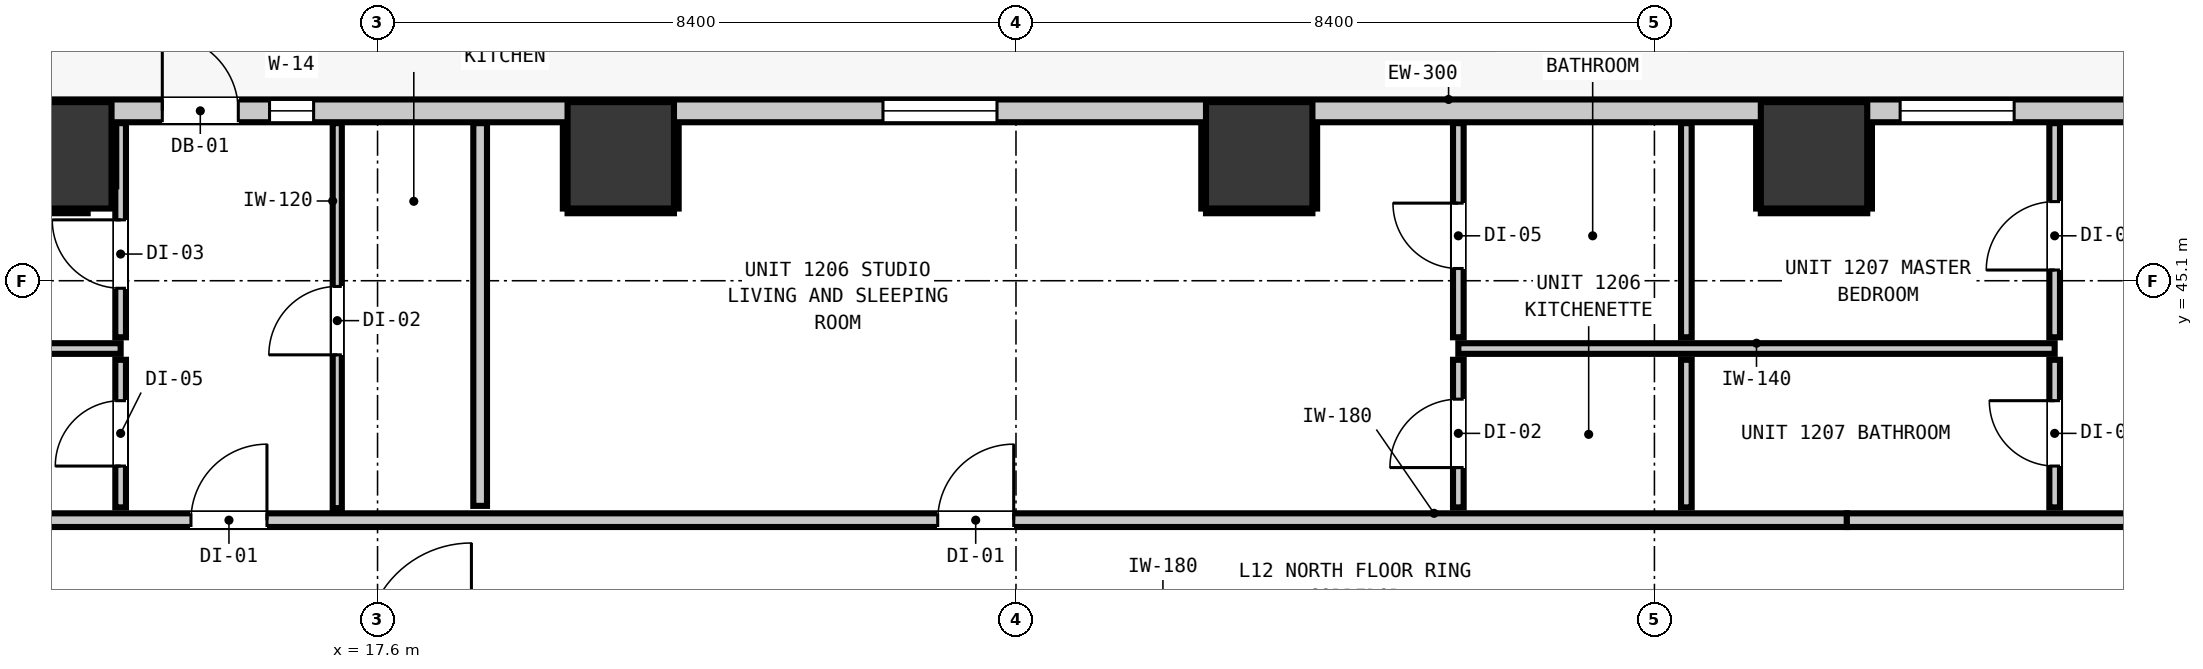
"""IFC4 building model, lengths in metres.
Left out: names, types, materials, properties, quantities, classifications, styles, units other than length and angle.
Written with IfcOpenShell. Run it as: python <this file> out.ifc"""

import sys

from ifc_helpers import new_model, si_unit, direction, frame, frame_2d, origin, origin_2d, place, context, subcontext, project, spatial, rectangle, extrude, element, fill, save


model = new_model("IFC4")
c1 = context("Model", 3, precision=1e-05, world=origin(), true_north=direction((0.0, 1.0)))
c2 = subcontext(c1, "Body", "Model", "MODEL_VIEW")
j1 = project(units=[si_unit("LENGTHUNIT", "METRE"), si_unit("PLANEANGLEUNIT", "RADIAN")], contexts=[c1])
p1 = place(None, origin())
s1 = spatial("IfcSite", under=j1, at=p1, CompositionType="ELEMENT")
p2 = place(p1, origin())
s2 = spatial("IfcBuilding", under=s1, at=p2, CompositionType="ELEMENT")
p3 = place(p2, frame((0.0, 0.0, 45.24)))
s3 = spatial("IfcBuildingStorey", under=s2, at=p3, CompositionType="ELEMENT", Elevation=45.24)
for number, where, z_axis, x_axis in (
    (1, (13.4, 46.75, 0.0), (0.0, 0.0, 1.0), (1.0, 0.0, 0.0)),
    (2, (20.8, 46.75, 0.0), (0.0, 0.0, 1.0), (1.0, 0.0, 0.0)),
    (3, (29.2, 46.75, 0.0), (0.0, 0.0, 1.0), (1.0, 0.0, 0.0)),
    (4, (36.5, 46.75, 0.0), (0.0, 0.0, 1.0), (1.0, 0.0, 0.0)),
):
    element("IfcColumn", number, at=place(p3, frame(where, z_axis=z_axis, x_axis=x_axis)), inside=s3, PredefinedType="COLUMN", context=c2, shape_type="SweptSolid", body=[
        extrude(rectangle(XDim=1.4, YDim=1.4, at=origin_2d()), origin(), (0.0, 0.0, 1.0), 3.32),
    ])
p4 = place(p3, frame((10.365, 47.335, 0.0), z_axis=(0.0, 0.0, 1.0), x_axis=(1.0, 0.0, 0.0)))
e5 = element("IfcWall", 5, at=p4, inside=s3, PredefinedType="STANDARD", context=c2, shape_type="SweptSolid", body=[
    extrude(rectangle(XDim=37.47, YDim=0.3, at=frame_2d((18.735, 0.0))), origin(), (0.0, 0.0, 1.0), 3.06),
])
p5 = place(p4, frame((4.403, 0.0, 0.0)))
e6 = element("IfcOpeningElement", 6, at=p5, cuts=e5, PredefinedType="OPENING", context=c2, shape_type="SweptSolid", body=[
    extrude(rectangle(XDim=1.0, YDim=2.15, at=frame_2d((0.5, 1.075))), frame((0.0, 0.16, 0.0), z_axis=(0.0, -1.0, 0.0), x_axis=(1.0, 0.0, 0.0)), (0.0, 0.0, 1.0), 0.32),
])
p6 = place(p4, frame((5.814, 0.0, 0.85)))
e7 = element("IfcOpeningElement", 7, at=p6, cuts=e5, PredefinedType="OPENING", context=c2, shape_type="SweptSolid", body=[
    extrude(rectangle(XDim=0.58, YDim=1.5, at=frame_2d((0.29, 0.75))), frame((0.0, 0.16, 0.0), z_axis=(0.0, -1.0, 0.0), x_axis=(1.0, 0.0, 0.0)), (0.0, 0.0, 1.0), 0.32),
])
p7 = place(p4, frame((0.462, 0.0, 0.85)))
e8 = element("IfcOpeningElement", 8, at=p7, cuts=e5, PredefinedType="OPENING", context=c2, shape_type="SweptSolid", body=[
    extrude(rectangle(XDim=1.5, YDim=1.8, at=frame_2d((0.75, 0.9))), frame((0.0, 0.16, 0.0), z_axis=(0.0, -1.0, 0.0), x_axis=(1.0, 0.0, 0.0)), (0.0, 0.0, 1.0), 0.32),
])
p8 = place(p4, frame((13.885, 0.0, 0.85)))
e9 = element("IfcOpeningElement", 9, at=p8, cuts=e5, PredefinedType="OPENING", context=c2, shape_type="SweptSolid", body=[
    extrude(rectangle(XDim=1.5, YDim=1.8, at=frame_2d((0.75, 0.9))), frame((0.0, 0.16, 0.0), z_axis=(0.0, -1.0, 0.0), x_axis=(1.0, 0.0, 0.0)), (0.0, 0.0, 1.0), 0.32),
])
p9 = place(p4, frame((31.742, 0.0, 0.85)))
e10 = element("IfcOpeningElement", 10, at=p9, cuts=e5, PredefinedType="OPENING", context=c2, shape_type="SweptSolid", body=[
    extrude(rectangle(XDim=1.5, YDim=1.8, at=frame_2d((0.75, 0.9))), frame((0.0, 0.16, 0.0), z_axis=(0.0, -1.0, 0.0), x_axis=(1.0, 0.0, 0.0)), (0.0, 0.0, 1.0), 0.32),
])
p10 = place(p4, frame((27.268, 0.0, 0.85)))
e11 = element("IfcOpeningElement", 11, at=p10, cuts=e5, PredefinedType="OPENING", context=c2, shape_type="SweptSolid", body=[
    extrude(rectangle(XDim=1.5, YDim=1.8, at=frame_2d((0.75, 0.9))), frame((0.0, 0.16, 0.0), z_axis=(0.0, -1.0, 0.0), x_axis=(1.0, 0.0, 0.0)), (0.0, 0.0, 1.0), 0.32),
])
p11 = place(p3, frame((8.027, 41.95, 0.0), z_axis=(0.0, 0.0, 1.0), x_axis=(1.0, 0.0, 0.0)))
e12 = element("IfcWall", 12, at=p11, inside=s3, PredefinedType="PARTITIONING", context=c2, shape_type="SweptSolid", body=[
    extrude(rectangle(XDim=28.905, YDim=0.18, at=frame_2d((14.452, 0.0))), origin(), (0.0, 0.0, 1.0), 3.06),
])
p12 = place(p11, frame((7.118, 0.0, 0.0)))
e13 = element("IfcOpeningElement", 13, at=p12, cuts=e12, PredefinedType="OPENING", context=c2, shape_type="SweptSolid", body=[
    extrude(rectangle(XDim=1.0, YDim=2.15, at=frame_2d((0.5, 1.075))), frame((0.0, 0.1, 0.0), z_axis=(0.0, -1.0, 0.0), x_axis=(1.0, 0.0, 0.0)), (0.0, 0.0, 1.0), 0.2),
])
p13 = place(p11, frame((16.943, 0.0, 0.0)))
e14 = element("IfcOpeningElement", 14, at=p13, cuts=e12, PredefinedType="OPENING", context=c2, shape_type="SweptSolid", body=[
    extrude(rectangle(XDim=1.0, YDim=2.15, at=frame_2d((0.5, 1.075))), frame((0.0, 0.1, 0.0), z_axis=(0.0, -1.0, 0.0), x_axis=(1.0, 0.0, 0.0)), (0.0, 0.0, 1.0), 0.2),
])
p14 = place(p3, frame((36.932, 41.95, 0.0), z_axis=(0.0, 0.0, 1.0), x_axis=(1.0, 0.0, 0.0)))
e15 = element("IfcWall", 15, at=p14, inside=s3, PredefinedType="PARTITIONING", context=c2, shape_type="SweptSolid", body=[
    extrude(rectangle(XDim=12.386, YDim=0.18, at=frame_2d((6.193, 0.0))), origin(), (0.0, 0.0, 1.0), 2.445),
])
p15 = place(p14, frame((5.425, 0.0, 0.0)))
e16 = element("IfcOpeningElement", 16, at=p15, cuts=e15, PredefinedType="OPENING", context=c2, shape_type="SweptSolid", body=[
    extrude(rectangle(XDim=1.0, YDim=2.15, at=frame_2d((0.5, 1.075))), frame((0.0, 0.1, 0.0), z_axis=(0.0, -1.0, 0.0), x_axis=(1.0, 0.0, 0.0)), (0.0, 0.0, 1.0), 0.2),
])
p16 = place(p3, frame((8.027, 44.208, 0.0), z_axis=(0.0, 0.0, 1.0), x_axis=(1.0, 0.0, 0.0)))
e17 = element("IfcWall", 17, at=p16, inside=s3, PredefinedType="PARTITIONING", context=c2, shape_type="SweptSolid", body=[
    extrude(rectangle(XDim=6.193, YDim=0.14, at=frame_2d((3.096, 0.0))), origin(), (0.0, 0.0, 1.0), 3.06),
])
p17 = place(p3, frame((31.82, 44.208, 0.0), z_axis=(0.0, 0.0, 1.0), x_axis=(1.0, 0.0, 0.0)))
e18 = element("IfcWall", 18, at=p17, inside=s3, PredefinedType="PARTITIONING", context=c2, shape_type="SweptSolid", body=[
    extrude(rectangle(XDim=7.846, YDim=0.14, at=frame_2d((3.923, 0.0))), origin(), (0.0, 0.0, 1.0), 3.06),
])
p18 = place(p3, frame((18.95, 42.138, 0.0), z_axis=(0.0, 0.0, 1.0), x_axis=(0.0, 1.0, 0.0)))
e19 = element("IfcWall", 19, at=p18, inside=s3, PredefinedType="PARTITIONING", context=c2, shape_type="SweptSolid", body=[
    extrude(rectangle(XDim=5.035, YDim=0.18, at=frame_2d((2.518, 0.0))), origin(), (0.0, 0.0, 1.0), 3.06),
])
p19 = place(p3, frame((14.22, 42.118, 0.0), z_axis=(0.0, 0.0, 1.0), x_axis=(0.0, 1.0, 0.0)))
e20 = element("IfcWall", 20, at=p19, inside=s3, PredefinedType="PARTITIONING", context=c2, shape_type="SweptSolid", body=[
    extrude(rectangle(XDim=1.942, YDim=0.14, at=frame_2d((0.971, 0.0))), origin(), (0.0, 0.0, 1.0), 3.06),
])
p20 = place(p19, frame((0.544, 0.0, 0.0)))
e21 = element("IfcOpeningElement", 21, at=p20, cuts=e20, PredefinedType="OPENING", context=c2, shape_type="SweptSolid", body=[
    extrude(rectangle(XDim=0.86, YDim=2.02, at=frame_2d((0.43, 1.01))), frame((0.0, 0.08, 0.0), z_axis=(0.0, -1.0, 0.0), x_axis=(1.0, 0.0, 0.0)), (0.0, 0.0, 1.0), 0.16),
])
p21 = place(p3, frame((14.22, 44.356, 0.0), z_axis=(0.0, 0.0, 1.0), x_axis=(0.0, 1.0, 0.0)))
e22 = element("IfcWall", 22, at=p21, inside=s3, PredefinedType="PARTITIONING", context=c2, shape_type="SweptSolid", body=[
    extrude(rectangle(XDim=2.817, YDim=0.14, at=frame_2d((1.409, 0.0))), origin(), (0.0, 0.0, 1.0), 3.06),
])
p22 = place(p21, frame((0.645, 0.0, 0.0)))
e23 = element("IfcOpeningElement", 23, at=p22, cuts=e22, PredefinedType="OPENING", context=c2, shape_type="SweptSolid", body=[
    extrude(rectangle(XDim=0.9, YDim=2.1, at=frame_2d((0.45, 1.05))), frame((0.0, 0.08, 0.0), z_axis=(0.0, -1.0, 0.0), x_axis=(1.0, 0.0, 0.0)), (0.0, 0.0, 1.0), 0.16),
])
p23 = place(p3, frame((31.82, 42.118, 0.0), z_axis=(0.0, 0.0, 1.0), x_axis=(0.0, 1.0, 0.0)))
e24 = element("IfcWall", 24, at=p23, inside=s3, PredefinedType="PARTITIONING", context=c2, shape_type="SweptSolid", body=[
    extrude(rectangle(XDim=1.942, YDim=0.14, at=frame_2d((0.971, 0.0))), origin(), (0.0, 0.0, 1.0), 3.06),
])
p24 = place(p23, frame((0.524, 0.0, 0.0)))
e25 = element("IfcOpeningElement", 25, at=p24, cuts=e24, PredefinedType="OPENING", context=c2, shape_type="SweptSolid", body=[
    extrude(rectangle(XDim=0.9, YDim=2.1, at=frame_2d((0.45, 1.05))), frame((0.0, 0.08, 0.0), z_axis=(0.0, -1.0, 0.0), x_axis=(1.0, 0.0, 0.0)), (0.0, 0.0, 1.0), 0.16),
])
p25 = place(p3, frame((31.82, 44.356, 0.0), z_axis=(0.0, 0.0, 1.0), x_axis=(0.0, 1.0, 0.0)))
e26 = element("IfcWall", 26, at=p25, inside=s3, PredefinedType="PARTITIONING", context=c2, shape_type="SweptSolid", body=[
    extrude(rectangle(XDim=2.817, YDim=0.14, at=frame_2d((1.409, 0.0))), origin(), (0.0, 0.0, 1.0), 3.06),
])
p26 = place(p25, frame((0.905, 0.0, 0.0)))
e27 = element("IfcOpeningElement", 27, at=p26, cuts=e26, PredefinedType="OPENING", context=c2, shape_type="SweptSolid", body=[
    extrude(rectangle(XDim=0.86, YDim=2.02, at=frame_2d((0.43, 1.01))), frame((0.0, 0.08, 0.0), z_axis=(0.0, -1.0, 0.0), x_axis=(1.0, 0.0, 0.0)), (0.0, 0.0, 1.0), 0.16),
])
p27 = place(p3, frame((34.82, 42.118, 0.0), z_axis=(0.0, 0.0, 1.0), x_axis=(0.0, 1.0, 0.0)))
e28 = element("IfcWall", 28, at=p27, inside=s3, PredefinedType="PARTITIONING", context=c2, shape_type="SweptSolid", body=[
    extrude(rectangle(XDim=1.942, YDim=0.14, at=frame_2d((0.971, 0.0))), origin(), (0.0, 0.0, 1.0), 3.06),
])
p28 = place(p3, frame((34.82, 44.356, 0.0), z_axis=(0.0, 0.0, 1.0), x_axis=(0.0, 1.0, 0.0)))
e29 = element("IfcWall", 29, at=p28, inside=s3, PredefinedType="PARTITIONING", context=c2, shape_type="SweptSolid", body=[
    extrude(rectangle(XDim=2.817, YDim=0.14, at=frame_2d((1.409, 0.0))), origin(), (0.0, 0.0, 1.0), 3.06),
])
p29 = place(p3, frame((39.666, 42.118, 0.0), z_axis=(0.0, 0.0, 1.0), x_axis=(0.0, 1.0, 0.0)))
e30 = element("IfcWall", 30, at=p29, inside=s3, PredefinedType="PARTITIONING", context=c2, shape_type="SweptSolid", body=[
    extrude(rectangle(XDim=1.942, YDim=0.14, at=frame_2d((0.971, 0.0))), origin(), (0.0, 0.0, 1.0), 3.06),
])
p30 = place(p29, frame((0.544, 0.0, 0.0)))
e31 = element("IfcOpeningElement", 31, at=p30, cuts=e30, PredefinedType="OPENING", context=c2, shape_type="SweptSolid", body=[
    extrude(rectangle(XDim=0.86, YDim=2.02, at=frame_2d((0.43, 1.01))), frame((0.0, 0.08, 0.0), z_axis=(0.0, -1.0, 0.0), x_axis=(1.0, 0.0, 0.0)), (0.0, 0.0, 1.0), 0.16),
])
p31 = place(p3, frame((39.666, 44.356, 0.0), z_axis=(0.0, 0.0, 1.0), x_axis=(0.0, 1.0, 0.0)))
e32 = element("IfcWall", 32, at=p31, inside=s3, PredefinedType="PARTITIONING", context=c2, shape_type="SweptSolid", body=[
    extrude(rectangle(XDim=2.817, YDim=0.14, at=frame_2d((1.409, 0.0))), origin(), (0.0, 0.0, 1.0), 3.06),
])
p32 = place(p31, frame((0.885, 0.0, 0.0)))
e33 = element("IfcOpeningElement", 33, at=p32, cuts=e32, PredefinedType="OPENING", context=c2, shape_type="SweptSolid", body=[
    extrude(rectangle(XDim=0.9, YDim=2.1, at=frame_2d((0.45, 1.05))), frame((0.0, 0.08, 0.0), z_axis=(0.0, -1.0, 0.0), x_axis=(1.0, 0.0, 0.0)), (0.0, 0.0, 1.0), 0.16),
])
p33 = place(p3, frame((17.07, 42.108, 0.0), z_axis=(0.0, 0.0, 1.0), x_axis=(0.0, 1.0, 0.0)))
e34 = element("IfcWall", 34, at=p33, inside=s3, PredefinedType="PARTITIONING", context=c2, shape_type="SweptSolid", body=[
    extrude(rectangle(XDim=5.065, YDim=0.12, at=frame_2d((2.533, 0.0))), origin(), (0.0, 0.0, 1.0), 3.06),
])
p34 = place(p33, frame((2.017, 0.0, 0.0)))
e35 = element("IfcOpeningElement", 35, at=p34, cuts=e34, PredefinedType="OPENING", context=c2, shape_type="SweptSolid", body=[
    extrude(rectangle(XDim=0.9, YDim=2.1, at=frame_2d((0.45, 1.05))), frame((0.0, 0.07, 0.0), z_axis=(0.0, -1.0, 0.0), x_axis=(1.0, 0.0, 0.0)), (0.0, 0.0, 1.0), 0.14),
])
p35 = place(p3, frame((12.7, 46.018, 0.0), z_axis=(0.0, 0.0, 1.0), x_axis=(1.0, 0.0, 0.0)))
e36 = element("IfcWall", 36, at=p35, inside=s3, PredefinedType="PARTITIONING", context=c2, shape_type="SweptSolid", body=[
    extrude(rectangle(XDim=1.086, YDim=0.06, at=frame_2d((0.543, 0.0))), origin(), (0.0, 0.0, 1.0), 1.45),
])
p36 = place(p3, frame((14.132, 46.342, 0.0), z_axis=(0.0, 0.0, 1.0), x_axis=(0.0, 1.0, 0.0)))
e37 = element("IfcWall", 37, at=p36, inside=s3, PredefinedType="PARTITIONING", context=c2, shape_type="SweptSolid", body=[
    extrude(rectangle(XDim=0.828, YDim=0.06, at=frame_2d((0.414, 0.0))), origin(), (0.0, 0.0, 1.0), 1.45),
])
p37 = place(p3, frame((20.1, 46.018, 0.0), z_axis=(0.0, 0.0, 1.0), x_axis=(1.0, 0.0, 0.0)))
e38 = element("IfcWall", 38, at=p37, inside=s3, PredefinedType="PARTITIONING", context=c2, shape_type="SweptSolid", body=[
    extrude(rectangle(XDim=1.4, YDim=0.06, at=frame_2d((0.7, 0.0))), origin(), (0.0, 0.0, 1.0), 1.45),
])
for number, where, z_axis, x_axis in (
    (39, (20.068, 46.05, 0.0), (0.0, 0.0, 1.0), (0.0, 1.0, 0.0)),
    (40, (21.532, 46.05, 0.0), (0.0, 0.0, 1.0), (0.0, 1.0, 0.0)),
):
    element("IfcWall", number, at=place(p3, frame(where, z_axis=z_axis, x_axis=x_axis)), inside=s3, PredefinedType="PARTITIONING", context=c2, shape_type="SweptSolid", body=[
        extrude(rectangle(XDim=1.12, YDim=0.06, at=frame_2d((0.56, 0.0))), origin(), (0.0, 0.0, 1.0), 1.45),
    ])
p38 = place(p3, frame((28.5, 46.018, 0.0), z_axis=(0.0, 0.0, 1.0), x_axis=(1.0, 0.0, 0.0)))
e41 = element("IfcWall", 41, at=p38, inside=s3, PredefinedType="PARTITIONING", context=c2, shape_type="SweptSolid", body=[
    extrude(rectangle(XDim=1.4, YDim=0.06, at=frame_2d((0.7, 0.0))), origin(), (0.0, 0.0, 1.0), 1.45),
])
for number, where, z_axis, x_axis in (
    (42, (28.468, 46.05, 0.0), (0.0, 0.0, 1.0), (0.0, 1.0, 0.0)),
    (43, (29.932, 46.05, 0.0), (0.0, 0.0, 1.0), (0.0, 1.0, 0.0)),
):
    element("IfcWall", number, at=place(p3, frame(where, z_axis=z_axis, x_axis=x_axis)), inside=s3, PredefinedType="PARTITIONING", context=c2, shape_type="SweptSolid", body=[
        extrude(rectangle(XDim=1.12, YDim=0.06, at=frame_2d((0.56, 0.0))), origin(), (0.0, 0.0, 1.0), 1.45),
    ])
p39 = place(p3, frame((35.8, 46.018, 0.0), z_axis=(0.0, 0.0, 1.0), x_axis=(1.0, 0.0, 0.0)))
e44 = element("IfcWall", 44, at=p39, inside=s3, PredefinedType="PARTITIONING", context=c2, shape_type="SweptSolid", body=[
    extrude(rectangle(XDim=1.4, YDim=0.06, at=frame_2d((0.7, 0.0))), origin(), (0.0, 0.0, 1.0), 1.45),
])
for number, where, z_axis, x_axis in (
    (45, (35.768, 46.05, 0.0), (0.0, 0.0, 1.0), (0.0, 1.0, 0.0)),
    (46, (37.232, 46.05, 0.0), (0.0, 0.0, 1.0), (0.0, 1.0, 0.0)),
):
    element("IfcWall", number, at=place(p3, frame(where, z_axis=z_axis, x_axis=x_axis)), inside=s3, PredefinedType="PARTITIONING", context=c2, shape_type="SweptSolid", body=[
        extrude(rectangle(XDim=1.12, YDim=0.06, at=frame_2d((0.56, 0.0))), origin(), (0.0, 0.0, 1.0), 1.45),
    ])
p40 = place(p5, origin())
e47 = element("IfcDoor", 47, at=p40, inside=s3, OperationType="SINGLE_SWING_LEFT", PredefinedType="DOOR", context=c2, shape_type="SweptSolid", body=[
    extrude(rectangle(XDim=1.0, YDim=2.15, at=frame_2d((0.5, 1.075))), frame((0.0, 0.025, 0.0), z_axis=(0.0, -1.0, 0.0), x_axis=(1.0, 0.0, 0.0)), (0.0, 0.0, 1.0), 0.05),
])
fill(e6, e47)
p41 = place(p6, origin())
e48 = element("IfcWindow", 48, at=p41, inside=s3, PartitioningType="SINGLE_PANEL", PredefinedType="WINDOW", context=c2, shape_type="SweptSolid", body=[
    extrude(rectangle(XDim=0.58, YDim=1.5, at=frame_2d((0.29, 0.75))), frame((0.0, 0.03, 0.0), z_axis=(0.0, -1.0, 0.0), x_axis=(1.0, 0.0, 0.0)), (0.0, 0.0, 1.0), 0.06),
])
fill(e7, e48)
p42 = place(p8, origin())
e49 = element("IfcWindow", 49, at=p42, inside=s3, PartitioningType="SINGLE_PANEL", PredefinedType="WINDOW", context=c2, shape_type="SweptSolid", body=[
    extrude(rectangle(XDim=1.5, YDim=1.8, at=frame_2d((0.75, 0.9))), frame((0.0, 0.03, 0.0), z_axis=(0.0, -1.0, 0.0), x_axis=(1.0, 0.0, 0.0)), (0.0, 0.0, 1.0), 0.06),
])
fill(e9, e49)
p43 = place(p10, origin())
e50 = element("IfcWindow", 50, at=p43, inside=s3, PartitioningType="SINGLE_PANEL", PredefinedType="WINDOW", context=c2, shape_type="SweptSolid", body=[
    extrude(rectangle(XDim=1.5, YDim=1.8, at=frame_2d((0.75, 0.9))), frame((0.0, 0.03, 0.0), z_axis=(0.0, -1.0, 0.0), x_axis=(1.0, 0.0, 0.0)), (0.0, 0.0, 1.0), 0.06),
])
fill(e11, e50)
p44 = place(p12, origin())
e51 = element("IfcDoor", 51, at=p44, inside=s3, OperationType="SINGLE_SWING_RIGHT", PredefinedType="DOOR", context=c2, shape_type="SweptSolid", body=[
    extrude(rectangle(XDim=1.0, YDim=2.15, at=frame_2d((0.5, 1.075))), frame((0.0, 0.025, 0.0), z_axis=(0.0, -1.0, 0.0), x_axis=(1.0, 0.0, 0.0)), (0.0, 0.0, 1.0), 0.05),
])
fill(e13, e51)
p45 = place(p20, origin())
e52 = element("IfcDoor", 52, at=p45, inside=s3, OperationType="SINGLE_SWING_LEFT", PredefinedType="DOOR", context=c2, shape_type="SweptSolid", body=[
    extrude(rectangle(XDim=0.86, YDim=2.02, at=frame_2d((0.43, 1.01))), frame((0.0, 0.025, 0.0), z_axis=(0.0, -1.0, 0.0), x_axis=(1.0, 0.0, 0.0)), (0.0, 0.0, 1.0), 0.05),
])
fill(e21, e52)
p46 = place(p22, origin())
e53 = element("IfcDoor", 53, at=p46, inside=s3, OperationType="SINGLE_SWING_RIGHT", PredefinedType="DOOR", context=c2, shape_type="SweptSolid", body=[
    extrude(rectangle(XDim=0.9, YDim=2.1, at=frame_2d((0.45, 1.05))), frame((0.0, 0.025, 0.0), z_axis=(0.0, -1.0, 0.0), x_axis=(1.0, 0.0, 0.0)), (0.0, 0.0, 1.0), 0.05),
])
fill(e23, e53)
p47 = place(p34, origin())
e54 = element("IfcDoor", 54, at=p47, inside=s3, OperationType="SINGLE_SWING_LEFT", PredefinedType="DOOR", context=c2, shape_type="SweptSolid", body=[
    extrude(rectangle(XDim=0.9, YDim=2.1, at=frame_2d((0.45, 1.05))), frame((0.0, 0.025, 0.0), z_axis=(0.0, -1.0, 0.0), x_axis=(1.0, 0.0, 0.0)), (0.0, 0.0, 1.0), 0.05),
])
fill(e35, e54)
p48 = place(p13, origin())
e55 = element("IfcDoor", 55, at=p48, inside=s3, OperationType="SINGLE_SWING_RIGHT", PredefinedType="DOOR", context=c2, shape_type="SweptSolid", body=[
    extrude(rectangle(XDim=1.0, YDim=2.15, at=frame_2d((0.5, 1.075))), frame((0.0, 0.025, 0.0), z_axis=(0.0, -1.0, 0.0), x_axis=(1.0, 0.0, 0.0)), (0.0, 0.0, 1.0), 0.05),
])
fill(e14, e55)
p49 = place(p24, origin())
e56 = element("IfcDoor", 56, at=p49, inside=s3, OperationType="SINGLE_SWING_LEFT", PredefinedType="DOOR", context=c2, shape_type="SweptSolid", body=[
    extrude(rectangle(XDim=0.9, YDim=2.1, at=frame_2d((0.45, 1.05))), frame((0.0, 0.025, 0.0), z_axis=(0.0, -1.0, 0.0), x_axis=(1.0, 0.0, 0.0)), (0.0, 0.0, 1.0), 0.05),
])
fill(e25, e56)
p50 = place(p26, origin())
e57 = element("IfcDoor", 57, at=p50, inside=s3, OperationType="SINGLE_SWING_RIGHT", PredefinedType="DOOR", context=c2, shape_type="SweptSolid", body=[
    extrude(rectangle(XDim=0.86, YDim=2.02, at=frame_2d((0.43, 1.01))), frame((0.0, 0.025, 0.0), z_axis=(0.0, -1.0, 0.0), x_axis=(1.0, 0.0, 0.0)), (0.0, 0.0, 1.0), 0.05),
])
fill(e27, e57)
p51 = place(p30, origin())
e58 = element("IfcDoor", 58, at=p51, inside=s3, OperationType="SINGLE_SWING_RIGHT", PredefinedType="DOOR", context=c2, shape_type="SweptSolid", body=[
    extrude(rectangle(XDim=0.86, YDim=2.02, at=frame_2d((0.43, 1.01))), frame((0.0, 0.025, 0.0), z_axis=(0.0, -1.0, 0.0), x_axis=(1.0, 0.0, 0.0)), (0.0, 0.0, 1.0), 0.05),
])
fill(e31, e58)
p52 = place(p32, origin())
e59 = element("IfcDoor", 59, at=p52, inside=s3, OperationType="SINGLE_SWING_LEFT", PredefinedType="DOOR", context=c2, shape_type="SweptSolid", body=[
    extrude(rectangle(XDim=0.9, YDim=2.1, at=frame_2d((0.45, 1.05))), frame((0.0, 0.025, 0.0), z_axis=(0.0, -1.0, 0.0), x_axis=(1.0, 0.0, 0.0)), (0.0, 0.0, 1.0), 0.05),
])
fill(e33, e59)
save(model, sys.argv[1])
